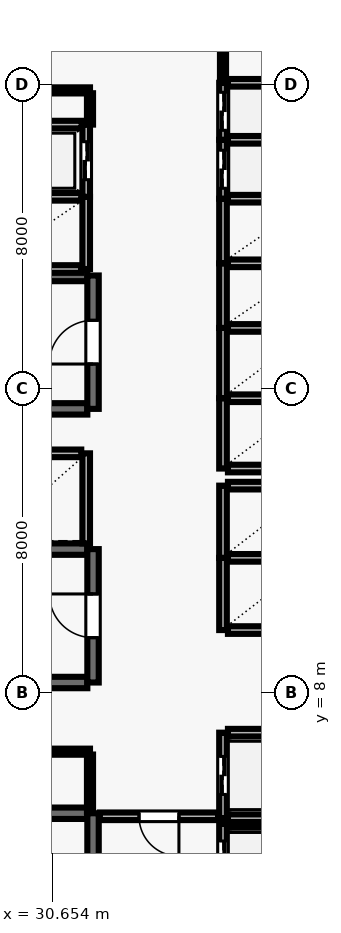
"""IFC4 building model, lengths in metres.
Left out: names, types, materials, properties, quantities, classifications, styles, units other than length and angle.
Written with IfcOpenShell. Run it as: python <this file> out.ifc"""

import sys

from ifc_helpers import new_model, si_unit, direction, frame, frame_2d, origin, place, context, subcontext, project, spatial, rectangle, extrude, element, fill, save


model = new_model("IFC4")
c1 = context("Model", 3, precision=1e-05, world=origin(), true_north=direction((0.0, 1.0)))
c2 = subcontext(c1, "Body", "Model", "MODEL_VIEW")
j1 = project(units=[si_unit("LENGTHUNIT", "METRE"), si_unit("PLANEANGLEUNIT", "RADIAN")], contexts=[c1])
p1 = place(None, origin())
s1 = spatial("IfcSite", under=j1, at=p1, CompositionType="ELEMENT")
p2 = place(p1, origin())
s2 = spatial("IfcBuilding", under=s1, at=p2, CompositionType="ELEMENT")
p3 = place(p2, frame((0.0, 0.0, 31.0)))
s3 = spatial("IfcBuildingStorey", under=s2, at=p3, CompositionType="ELEMENT", Elevation=31.0)
p4 = place(p3, frame((31.58, 4.83, 0.0), z_axis=(0.0, 0.0, 1.0), x_axis=(-1.0, 0.0, 0.0)))
e1 = element("IfcWall", 1, at=p4, inside=s3, PredefinedType="SHEAR", context=c2, shape_type="SweptSolid", body=[
    extrude(rectangle(XDim=8.36, YDim=0.3, at=frame_2d((4.18, 0.0))), origin(), (0.0, 0.0, 1.0), 3.69),
])
p5 = place(p3, frame((31.73, 0.96, 0.0), z_axis=(0.0, 0.0, 1.0), x_axis=(0.0, 1.0, 0.0)))
e2 = element("IfcWall", 2, at=p5, inside=s3, PredefinedType="SHEAR", context=c2, shape_type="SweptSolid", body=[
    extrude(rectangle(XDim=3.87, YDim=0.3, at=frame_2d((1.935, 0.0))), origin(), (0.0, 0.0, 1.0), 3.69),
])
p6 = place(p5, frame((1.54, 0.0, 0.0)))
e3 = element("IfcOpeningElement", 3, at=p6, cuts=e2, PredefinedType="OPENING", context=c2, shape_type="SweptSolid", body=[
    extrude(rectangle(XDim=1.15, YDim=2.15, at=frame_2d((0.575, 1.075))), frame((0.0, 0.16, 0.0), z_axis=(0.0, -1.0, 0.0), x_axis=(1.0, 0.0, 0.0)), (0.0, 0.0, 1.0), 0.32),
])
for number, where, z_axis, x_axis in (
    (4, (31.58, 18.98, 0.0), (0.0, 0.0, 1.0), (-1.0, 0.0, 0.0)),
    (5, (23.22, 15.47, 0.0), (0.0, 0.0, 1.0), (1.0, 0.0, 0.0)),
):
    element("IfcWall", number, at=place(p3, frame(where, z_axis=z_axis, x_axis=x_axis)), inside=s3, PredefinedType="SHEAR", context=c2, shape_type="SweptSolid", body=[
        extrude(rectangle(XDim=8.36, YDim=0.3, at=frame_2d((4.18, 0.0))), origin(), (0.0, 0.0, 1.0), 3.69),
    ])
p7 = place(p3, frame((31.73, 15.47, 0.0), z_axis=(0.0, 0.0, 1.0), x_axis=(0.0, 1.0, 0.0)))
e6 = element("IfcWall", 6, at=p7, inside=s3, PredefinedType="SHEAR", context=c2, shape_type="SweptSolid", body=[
    extrude(rectangle(XDim=3.51, YDim=0.3, at=frame_2d((1.755, 0.0))), origin(), (0.0, 0.0, 1.0), 3.69),
])
p8 = place(p7, frame((1.18, 0.0, 0.0)))
e7 = element("IfcOpeningElement", 7, at=p8, cuts=e6, PredefinedType="OPENING", context=c2, shape_type="SweptSolid", body=[
    extrude(rectangle(XDim=1.15, YDim=2.15, at=frame_2d((0.575, 1.075))), frame((0.0, 0.16, 0.0), z_axis=(0.0, -1.0, 0.0), x_axis=(1.0, 0.0, 0.0)), (0.0, 0.0, 1.0), 0.32),
])
for number, where, z_axis, x_axis in (
    (8, (31.58, 11.78, 0.0), (0.0, 0.0, 1.0), (-1.0, 0.0, 0.0)),
    (9, (23.22, 8.27, 0.0), (0.0, 0.0, 1.0), (1.0, 0.0, 0.0)),
):
    element("IfcWall", number, at=place(p3, frame(where, z_axis=z_axis, x_axis=x_axis)), inside=s3, PredefinedType="SHEAR", context=c2, shape_type="SweptSolid", body=[
        extrude(rectangle(XDim=8.36, YDim=0.3, at=frame_2d((4.18, 0.0))), origin(), (0.0, 0.0, 1.0), 3.69),
    ])
p9 = place(p3, frame((31.73, 8.27, 0.0), z_axis=(0.0, 0.0, 1.0), x_axis=(0.0, 1.0, 0.0)))
e10 = element("IfcWall", 10, at=p9, inside=s3, PredefinedType="SHEAR", context=c2, shape_type="SweptSolid", body=[
    extrude(rectangle(XDim=3.51, YDim=0.3, at=frame_2d((1.755, 0.0))), origin(), (0.0, 0.0, 1.0), 3.69),
])
p10 = place(p9, frame((1.18, 0.0, 0.0)))
e11 = element("IfcOpeningElement", 11, at=p10, cuts=e10, PredefinedType="OPENING", context=c2, shape_type="SweptSolid", body=[
    extrude(rectangle(XDim=1.15, YDim=2.15, at=frame_2d((0.575, 1.075))), frame((0.0, 0.16, 0.0), z_axis=(0.0, -1.0, 0.0), x_axis=(1.0, 0.0, 0.0)), (0.0, 0.0, 1.0), 0.32),
])
p11 = place(p3, frame((35.15, 4.55, 0.0), z_axis=(0.0, 0.0, 1.0), x_axis=(0.0, -1.0, 0.0)))
e12 = element("IfcWall", 12, at=p11, inside=s3, PredefinedType="SOLIDWALL", context=c2, shape_type="SweptSolid", body=[
    extrude(rectangle(XDim=2.1, YDim=0.2, at=frame_2d((1.05, 0.0))), origin(), (0.0, 0.0, 1.0), 3.69),
])
p12 = place(p11, frame((0.45, 0.0, 0.0)))
e13 = element("IfcOpeningElement", 13, at=p12, cuts=e12, PredefinedType="OPENING", context=c2, shape_type="SweptSolid", body=[
    extrude(rectangle(XDim=1.2, YDim=2.15, at=frame_2d((0.6, 1.075))), frame((0.0, 0.11, 0.0), z_axis=(0.0, -1.0, 0.0), x_axis=(1.0, 0.0, 0.0)), (0.0, 0.0, 1.0), 0.22),
])
p13 = place(p3, frame((37.42, 4.55, 0.0), z_axis=(0.0, 0.0, 1.0), x_axis=(-1.0, 0.0, 0.0)))
e14 = element("IfcWall", 14, at=p13, inside=s3, PredefinedType="SOLIDWALL", context=c2, shape_type="SweptSolid", body=[
    extrude(rectangle(XDim=2.14, YDim=0.2, at=frame_2d((1.07, 0.0))), origin(), (0.0, 0.0, 1.0), 3.69),
])
p14 = place(p3, frame((35.15, 6.95, 0.0), z_axis=(0.0, 0.0, 1.0), x_axis=(0.0, -1.0, 0.0)))
e15 = element("IfcWall", 15, at=p14, inside=s3, PredefinedType="SOLIDWALL", context=c2, shape_type="SweptSolid", body=[
    extrude(rectangle(XDim=2.25, YDim=0.2, at=frame_2d((1.125, 0.0))), origin(), (0.0, 0.0, 1.0), 3.69),
])
p15 = place(p14, frame((0.625, 0.0, 0.0)))
e16 = element("IfcOpeningElement", 16, at=p15, cuts=e15, PredefinedType="OPENING", context=c2, shape_type="SweptSolid", body=[
    extrude(rectangle(XDim=1.0, YDim=2.1, at=frame_2d((0.5, 1.05))), frame((0.0, 0.11, 0.0), z_axis=(0.0, -1.0, 0.0), x_axis=(1.0, 0.0, 0.0)), (0.0, 0.0, 1.0), 0.22),
])
for number, where, z_axis, x_axis in (
    (17, (35.28, 4.7, 0.0), (0.0, 0.0, 1.0), (1.0, 0.0, 0.0)),
    (18, (37.42, 6.95, 0.0), (0.0, 0.0, 1.0), (-1.0, 0.0, 0.0)),
):
    element("IfcWall", number, at=place(p3, frame(where, z_axis=z_axis, x_axis=x_axis)), inside=s3, PredefinedType="SOLIDWALL", context=c2, shape_type="SweptSolid", body=[
        extrude(rectangle(XDim=2.14, YDim=0.2, at=frame_2d((1.07, 0.0))), origin(), (0.0, 0.0, 1.0), 3.69),
    ])
p16 = place(p3, frame((35.15, 11.55, 0.0), z_axis=(0.0, 0.0, 1.0), x_axis=(0.0, -1.0, 0.0)))
e19 = element("IfcWall", 19, at=p16, inside=s3, PredefinedType="SOLIDWALL", context=c2, shape_type="SweptSolid", body=[
    extrude(rectangle(XDim=1.9, YDim=0.2, at=frame_2d((0.95, 0.0))), origin(), (0.0, 0.0, 1.0), 3.69),
])
for number, where, z_axis, x_axis in (
    (20, (35.28, 9.65, 0.0), (0.0, 0.0, 1.0), (1.0, 0.0, 0.0)),
    (21, (37.42, 11.55, 0.0), (0.0, 0.0, 1.0), (-1.0, 0.0, 0.0)),
):
    element("IfcWall", number, at=place(p3, frame(where, z_axis=z_axis, x_axis=x_axis)), inside=s3, PredefinedType="SOLIDWALL", context=c2, shape_type="SweptSolid", body=[
        extrude(rectangle(XDim=2.14, YDim=0.2, at=frame_2d((1.07, 0.0))), origin(), (0.0, 0.0, 1.0), 3.69),
    ])
p17 = place(p3, frame((35.15, 13.45, 0.0), z_axis=(0.0, 0.0, 1.0), x_axis=(0.0, -1.0, 0.0)))
e22 = element("IfcWall", 22, at=p17, inside=s3, PredefinedType="SOLIDWALL", context=c2, shape_type="SweptSolid", body=[
    extrude(rectangle(XDim=1.9, YDim=0.2, at=frame_2d((0.95, 0.0))), origin(), (0.0, 0.0, 1.0), 3.69),
])
p18 = place(p3, frame((37.42, 13.45, 0.0), z_axis=(0.0, 0.0, 1.0), x_axis=(-1.0, 0.0, 0.0)))
e23 = element("IfcWall", 23, at=p18, inside=s3, PredefinedType="SOLIDWALL", context=c2, shape_type="SweptSolid", body=[
    extrude(rectangle(XDim=2.14, YDim=0.2, at=frame_2d((1.07, 0.0))), origin(), (0.0, 0.0, 1.0), 3.69),
])
p19 = place(p3, frame((31.55, 11.93, 0.0), z_axis=(0.0, 0.0, 1.0), x_axis=(0.0, 1.0, 0.0)))
e24 = element("IfcWall", 24, at=p19, inside=s3, PredefinedType="SOLIDWALL", context=c2, shape_type="SweptSolid", body=[
    extrude(rectangle(XDim=2.37, YDim=0.2, at=frame_2d((1.185, 0.0))), origin(), (0.0, 0.0, 1.0), 3.69),
])
p20 = place(p3, frame((31.42, 14.3, 0.0), z_axis=(0.0, 0.0, 1.0), x_axis=(-1.0, 0.0, 0.0)))
e25 = element("IfcWall", 25, at=p20, inside=s3, PredefinedType="SOLIDWALL", context=c2, shape_type="SweptSolid", body=[
    extrude(rectangle(XDim=2.44, YDim=0.2, at=frame_2d((1.22, 0.0))), origin(), (0.0, 0.0, 1.0), 3.69),
])
p21 = place(p3, frame((35.15, 15.75, 0.0), z_axis=(0.0, 0.0, 1.0), x_axis=(0.0, -1.0, 0.0)))
e26 = element("IfcWall", 26, at=p21, inside=s3, PredefinedType="SOLIDWALL", context=c2, shape_type="SweptSolid", body=[
    extrude(rectangle(XDim=1.85, YDim=0.2, at=frame_2d((0.925, 0.0))), origin(), (0.0, 0.0, 1.0), 3.69),
])
for number, where, z_axis, x_axis in (
    (27, (35.28, 13.9, 0.0), (0.0, 0.0, 1.0), (1.0, 0.0, 0.0)),
    (28, (37.42, 15.75, 0.0), (0.0, 0.0, 1.0), (-1.0, 0.0, 0.0)),
):
    element("IfcWall", number, at=place(p3, frame(where, z_axis=z_axis, x_axis=x_axis)), inside=s3, PredefinedType="SOLIDWALL", context=c2, shape_type="SweptSolid", body=[
        extrude(rectangle(XDim=2.14, YDim=0.2, at=frame_2d((1.07, 0.0))), origin(), (0.0, 0.0, 1.0), 3.69),
    ])
p22 = place(p3, frame((35.15, 17.6, 0.0), z_axis=(0.0, 0.0, 1.0), x_axis=(0.0, -1.0, 0.0)))
e29 = element("IfcWall", 29, at=p22, inside=s3, PredefinedType="SOLIDWALL", context=c2, shape_type="SweptSolid", body=[
    extrude(rectangle(XDim=1.85, YDim=0.2, at=frame_2d((0.925, 0.0))), origin(), (0.0, 0.0, 1.0), 3.69),
])
p23 = place(p3, frame((37.42, 17.6, 0.0), z_axis=(0.0, 0.0, 1.0), x_axis=(-1.0, 0.0, 0.0)))
e30 = element("IfcWall", 30, at=p23, inside=s3, PredefinedType="SOLIDWALL", context=c2, shape_type="SweptSolid", body=[
    extrude(rectangle(XDim=2.14, YDim=0.2, at=frame_2d((1.07, 0.0))), origin(), (0.0, 0.0, 1.0), 3.69),
])
p24 = place(p3, frame((35.15, 19.3, 0.0), z_axis=(0.0, 0.0, 1.0), x_axis=(0.0, -1.0, 0.0)))
e31 = element("IfcWall", 31, at=p24, inside=s3, PredefinedType="SOLIDWALL", context=c2, shape_type="SweptSolid", body=[
    extrude(rectangle(XDim=1.7, YDim=0.2, at=frame_2d((0.85, 0.0))), origin(), (0.0, 0.0, 1.0), 3.69),
])
p25 = place(p3, frame((37.42, 19.3, 0.0), z_axis=(0.0, 0.0, 1.0), x_axis=(-1.0, 0.0, 0.0)))
e32 = element("IfcWall", 32, at=p25, inside=s3, PredefinedType="SOLIDWALL", context=c2, shape_type="SweptSolid", body=[
    extrude(rectangle(XDim=2.14, YDim=0.2, at=frame_2d((1.07, 0.0))), origin(), (0.0, 0.0, 1.0), 3.69),
])
p26 = place(p3, frame((35.15, 21.0, 0.0), z_axis=(0.0, 0.0, 1.0), x_axis=(0.0, -1.0, 0.0)))
e33 = element("IfcWall", 33, at=p26, inside=s3, PredefinedType="SOLIDWALL", context=c2, shape_type="SweptSolid", body=[
    extrude(rectangle(XDim=1.7, YDim=0.2, at=frame_2d((0.85, 0.0))), origin(), (0.0, 0.0, 1.0), 3.69),
])
p27 = place(p3, frame((37.42, 21.0, 0.0), z_axis=(0.0, 0.0, 1.0), x_axis=(-1.0, 0.0, 0.0)))
e34 = element("IfcWall", 34, at=p27, inside=s3, PredefinedType="SOLIDWALL", context=c2, shape_type="SweptSolid", body=[
    extrude(rectangle(XDim=2.14, YDim=0.2, at=frame_2d((1.07, 0.0))), origin(), (0.0, 0.0, 1.0), 3.69),
])
p28 = place(p3, frame((31.55, 19.15, 0.0), z_axis=(0.0, 0.0, 1.0), x_axis=(0.0, 1.0, 0.0)))
e35 = element("IfcWall", 35, at=p28, inside=s3, PredefinedType="SOLIDWALL", context=c2, shape_type="SweptSolid", body=[
    extrude(rectangle(XDim=1.9, YDim=0.2, at=frame_2d((0.95, 0.0))), origin(), (0.0, 0.0, 1.0), 3.69),
])
for number, where, z_axis, x_axis in (
    (36, (28.98, 19.15, 0.0), (0.0, 0.0, 1.0), (1.0, 0.0, 0.0)),
    (37, (31.42, 21.05, 0.0), (0.0, 0.0, 1.0), (-1.0, 0.0, 0.0)),
):
    element("IfcWall", number, at=place(p3, frame(where, z_axis=z_axis, x_axis=x_axis)), inside=s3, PredefinedType="SOLIDWALL", context=c2, shape_type="SweptSolid", body=[
        extrude(rectangle(XDim=2.44, YDim=0.2, at=frame_2d((1.22, 0.0))), origin(), (0.0, 0.0, 1.0), 3.69),
    ])
p29 = place(p3, frame((35.15, 22.55, 0.0), z_axis=(0.0, 0.0, 1.0), x_axis=(0.0, -1.0, 0.0)))
e38 = element("IfcWall", 38, at=p29, inside=s3, PredefinedType="SOLIDWALL", context=c2, shape_type="SweptSolid", body=[
    extrude(rectangle(XDim=1.55, YDim=0.2, at=frame_2d((0.775, 0.0))), origin(), (0.0, 0.0, 1.0), 3.69),
])
p30 = place(p29, frame((0.275, 0.0, 0.0)))
e39 = element("IfcOpeningElement", 39, at=p30, cuts=e38, PredefinedType="OPENING", context=c2, shape_type="SweptSolid", body=[
    extrude(rectangle(XDim=1.0, YDim=2.1, at=frame_2d((0.5, 1.05))), frame((0.0, 0.11, 0.0), z_axis=(0.0, -1.0, 0.0), x_axis=(1.0, 0.0, 0.0)), (0.0, 0.0, 1.0), 0.22),
])
p31 = place(p3, frame((37.42, 22.55, 0.0), z_axis=(0.0, 0.0, 1.0), x_axis=(-1.0, 0.0, 0.0)))
e40 = element("IfcWall", 40, at=p31, inside=s3, PredefinedType="SOLIDWALL", context=c2, shape_type="SweptSolid", body=[
    extrude(rectangle(XDim=2.14, YDim=0.2, at=frame_2d((1.07, 0.0))), origin(), (0.0, 0.0, 1.0), 3.69),
])
p32 = place(p3, frame((35.15, 24.05, 0.0), z_axis=(0.0, 0.0, 1.0), x_axis=(0.0, -1.0, 0.0)))
e41 = element("IfcWall", 41, at=p32, inside=s3, PredefinedType="SOLIDWALL", context=c2, shape_type="SweptSolid", body=[
    extrude(rectangle(XDim=1.5, YDim=0.2, at=frame_2d((0.75, 0.0))), origin(), (0.0, 0.0, 1.0), 3.69),
])
p33 = place(p32, frame((0.25, 0.0, 0.0)))
e42 = element("IfcOpeningElement", 42, at=p33, cuts=e41, PredefinedType="OPENING", context=c2, shape_type="SweptSolid", body=[
    extrude(rectangle(XDim=1.0, YDim=2.1, at=frame_2d((0.5, 1.05))), frame((0.0, 0.11, 0.0), z_axis=(0.0, -1.0, 0.0), x_axis=(1.0, 0.0, 0.0)), (0.0, 0.0, 1.0), 0.22),
])
p34 = place(p3, frame((37.42, 24.05, 0.0), z_axis=(0.0, 0.0, 1.0), x_axis=(-1.0, 0.0, 0.0)))
e43 = element("IfcWall", 43, at=p34, inside=s3, PredefinedType="SOLIDWALL", context=c2, shape_type="SweptSolid", body=[
    extrude(rectangle(XDim=2.14, YDim=0.2, at=frame_2d((1.07, 0.0))), origin(), (0.0, 0.0, 1.0), 3.69),
])
p35 = place(p3, frame((31.55, 21.05, 0.0), z_axis=(0.0, 0.0, 1.0), x_axis=(0.0, 1.0, 0.0)))
e44 = element("IfcWall", 44, at=p35, inside=s3, PredefinedType="SOLIDWALL", context=c2, shape_type="SweptSolid", body=[
    extrude(rectangle(XDim=1.9, YDim=0.2, at=frame_2d((0.95, 0.0))), origin(), (0.0, 0.0, 1.0), 3.69),
])
p36 = place(p35, frame((0.45, 0.0, 0.0)))
e45 = element("IfcOpeningElement", 45, at=p36, cuts=e44, PredefinedType="OPENING", context=c2, shape_type="SweptSolid", body=[
    extrude(rectangle(XDim=1.0, YDim=2.1, at=frame_2d((0.5, 1.05))), frame((0.0, 0.11, 0.0), z_axis=(0.0, -1.0, 0.0), x_axis=(1.0, 0.0, 0.0)), (0.0, 0.0, 1.0), 0.22),
])
p37 = place(p3, frame((31.43, 22.95, 0.0), z_axis=(0.0, 0.0, 1.0), x_axis=(-1.0, 0.0, 0.0)))
e46 = element("IfcWall", 46, at=p37, inside=s3, PredefinedType="SOLIDWALL", context=c2, shape_type="SweptSolid", body=[
    extrude(rectangle(XDim=2.46, YDim=0.2, at=frame_2d((1.23, 0.0))), origin(), (0.0, 0.0, 1.0), 3.69),
])
p38 = place(p3, frame((28.55, 6.45, 0.0), z_axis=(0.0, 0.0, 1.0), x_axis=(1.0, 0.0, 0.0)))
e47 = element("IfcWall", 47, at=p38, inside=s3, PredefinedType="PARTITIONING", context=c2, shape_type="SweptSolid", body=[
    extrude(rectangle(XDim=3.1, YDim=0.16, at=frame_2d((1.55, 0.0))), origin(), (0.0, 0.0, 1.0), 3.69),
])
p39 = place(p38, frame((1.11, 0.0, 0.0)))
e48 = element("IfcOpeningElement", 48, at=p39, cuts=e47, PredefinedType="OPENING", context=c2, shape_type="SweptSolid", body=[
    extrude(rectangle(XDim=0.88, YDim=2.1, at=frame_2d((0.44, 1.05))), frame((0.0, 0.09, 0.0), z_axis=(0.0, -1.0, 0.0), x_axis=(1.0, 0.0, 0.0)), (0.0, 0.0, 1.0), 0.18),
])
p40 = place(p3, frame((28.8, 23.85, 0.0), z_axis=(0.0, 0.0, 1.0), x_axis=(1.0, 0.0, 0.0)))
e49 = element("IfcWall", 49, at=p40, inside=s3, PredefinedType="PARTITIONING", context=c2, shape_type="SweptSolid", body=[
    extrude(rectangle(XDim=2.85, YDim=0.16, at=frame_2d((1.425, 0.0))), origin(), (0.0, 0.0, 1.0), 3.69),
])
p41 = place(p3, frame((35.02, 4.75, 0.0), z_axis=(0.0, 0.0, 1.0), x_axis=(-1.0, 0.0, 0.0)))
e50 = element("IfcWall", 50, at=p41, inside=s3, PredefinedType="SOLIDWALL", context=c2, shape_type="SweptSolid", body=[
    extrude(rectangle(XDim=3.11, YDim=0.2, at=frame_2d((1.555, 0.0))), origin(), (0.0, 0.0, 1.0), 3.69),
])
p42 = place(p41, frame((1.03, 0.0, 0.0)))
e51 = element("IfcOpeningElement", 51, at=p42, cuts=e50, PredefinedType="OPENING", context=c2, shape_type="SweptSolid", body=[
    extrude(rectangle(XDim=1.05, YDim=2.15, at=frame_2d((0.525, 1.075))), frame((0.0, 0.11, 0.0), z_axis=(0.0, -1.0, 0.0), x_axis=(1.0, 0.0, 0.0)), (0.0, 0.0, 1.0), 0.22),
])
p43 = place(p3, frame((31.65, 4.86, 0.0), z_axis=(0.0, 0.0, 1.0), x_axis=(0.0, 1.0, 0.0)))
e52 = element("IfcWall", 52, at=p43, inside=s3, PredefinedType="PARTITIONING", context=c2, shape_type="SweptSolid", body=[
    extrude(rectangle(XDim=1.515, YDim=0.16, at=frame_2d((0.757, 0.0))), origin(), (0.0, 0.0, 1.0), 3.69),
])
p44 = place(p3, frame((31.65, 23.775, 0.0), z_axis=(0.0, 0.0, 1.0), x_axis=(0.0, -1.0, 0.0)))
e53 = element("IfcWall", 53, at=p44, inside=s3, PredefinedType="PARTITIONING", context=c2, shape_type="SweptSolid", body=[
    extrude(rectangle(XDim=0.825, YDim=0.16, at=frame_2d((0.413, 0.0))), origin(), (0.0, 0.0, 1.0), 3.69),
])
p45 = place(p3, frame((35.15, 24.07, 0.0), z_axis=(0.0, 0.0, 1.0), x_axis=(0.0, 1.0, 0.0)))
e54 = element("IfcWall", 54, at=p45, inside=s3, PredefinedType="PARTITIONING", context=c2, shape_type="SweptSolid", body=[
    extrude(rectangle(XDim=1.855, YDim=0.16, at=frame_2d((0.927, 0.0))), origin(), (0.0, 0.0, 1.0), 3.69),
])
p46 = place(p8, origin())
e55 = element("IfcDoor", 55, at=p46, inside=s3, OperationType="SINGLE_SWING_LEFT", PredefinedType="DOOR", context=c2, shape_type="SweptSolid", body=[
    extrude(rectangle(XDim=1.15, YDim=2.15, at=frame_2d((0.575, 1.075))), frame((0.0, 0.025, 0.0), z_axis=(0.0, -1.0, 0.0), x_axis=(1.0, 0.0, 0.0)), (0.0, 0.0, 1.0), 0.05),
])
fill(e7, e55)
p47 = place(p10, origin())
e56 = element("IfcDoor", 56, at=p47, inside=s3, OperationType="SINGLE_SWING_RIGHT", PredefinedType="DOOR", context=c2, shape_type="SweptSolid", body=[
    extrude(rectangle(XDim=1.15, YDim=2.15, at=frame_2d((0.575, 1.075))), frame((0.0, 0.025, 0.0), z_axis=(0.0, -1.0, 0.0), x_axis=(1.0, 0.0, 0.0)), (0.0, 0.0, 1.0), 0.05),
])
fill(e11, e56)
p48 = place(p12, origin())
e57 = element("IfcDoor", 57, at=p48, inside=s3, OperationType="DOUBLE_DOOR_SLIDING", PredefinedType="DOOR", context=c2, shape_type="SweptSolid", body=[
    extrude(rectangle(XDim=1.2, YDim=2.15, at=frame_2d((0.6, 1.075))), frame((0.0, 0.025, 0.0), z_axis=(0.0, -1.0, 0.0), x_axis=(1.0, 0.0, 0.0)), (0.0, 0.0, 1.0), 0.05),
])
fill(e13, e57)
p49 = place(p15, origin())
e58 = element("IfcDoor", 58, at=p49, inside=s3, OperationType="DOUBLE_DOOR_SLIDING", PredefinedType="DOOR", context=c2, shape_type="SweptSolid", body=[
    extrude(rectangle(XDim=1.0, YDim=2.1, at=frame_2d((0.5, 1.05))), frame((0.0, 0.025, 0.0), z_axis=(0.0, -1.0, 0.0), x_axis=(1.0, 0.0, 0.0)), (0.0, 0.0, 1.0), 0.05),
])
fill(e16, e58)
p50 = place(p30, origin())
e59 = element("IfcDoor", 59, at=p50, inside=s3, OperationType="DOUBLE_DOOR_SLIDING", PredefinedType="DOOR", context=c2, shape_type="SweptSolid", body=[
    extrude(rectangle(XDim=1.0, YDim=2.1, at=frame_2d((0.5, 1.05))), frame((0.0, 0.025, 0.0), z_axis=(0.0, -1.0, 0.0), x_axis=(1.0, 0.0, 0.0)), (0.0, 0.0, 1.0), 0.05),
])
fill(e39, e59)
p51 = place(p33, origin())
e60 = element("IfcDoor", 60, at=p51, inside=s3, OperationType="DOUBLE_DOOR_SLIDING", PredefinedType="DOOR", context=c2, shape_type="SweptSolid", body=[
    extrude(rectangle(XDim=1.0, YDim=2.1, at=frame_2d((0.5, 1.05))), frame((0.0, 0.025, 0.0), z_axis=(0.0, -1.0, 0.0), x_axis=(1.0, 0.0, 0.0)), (0.0, 0.0, 1.0), 0.05),
])
fill(e42, e60)
p52 = place(p36, origin())
e61 = element("IfcDoor", 61, at=p52, inside=s3, OperationType="DOUBLE_DOOR_SLIDING", PredefinedType="DOOR", context=c2, shape_type="SweptSolid", body=[
    extrude(rectangle(XDim=1.0, YDim=2.1, at=frame_2d((0.5, 1.05))), frame((0.0, 0.025, 0.0), z_axis=(0.0, -1.0, 0.0), x_axis=(1.0, 0.0, 0.0)), (0.0, 0.0, 1.0), 0.05),
])
fill(e45, e61)
p53 = place(p42, origin())
e62 = element("IfcDoor", 62, at=p53, inside=s3, OperationType="SINGLE_SWING_LEFT", PredefinedType="DOOR", context=c2, shape_type="SweptSolid", body=[
    extrude(rectangle(XDim=1.05, YDim=2.15, at=frame_2d((0.525, 1.075))), frame((0.0, 0.025, 0.0), z_axis=(0.0, -1.0, 0.0), x_axis=(1.0, 0.0, 0.0)), (0.0, 0.0, 1.0), 0.05),
])
fill(e51, e62)
save(model, sys.argv[1])
